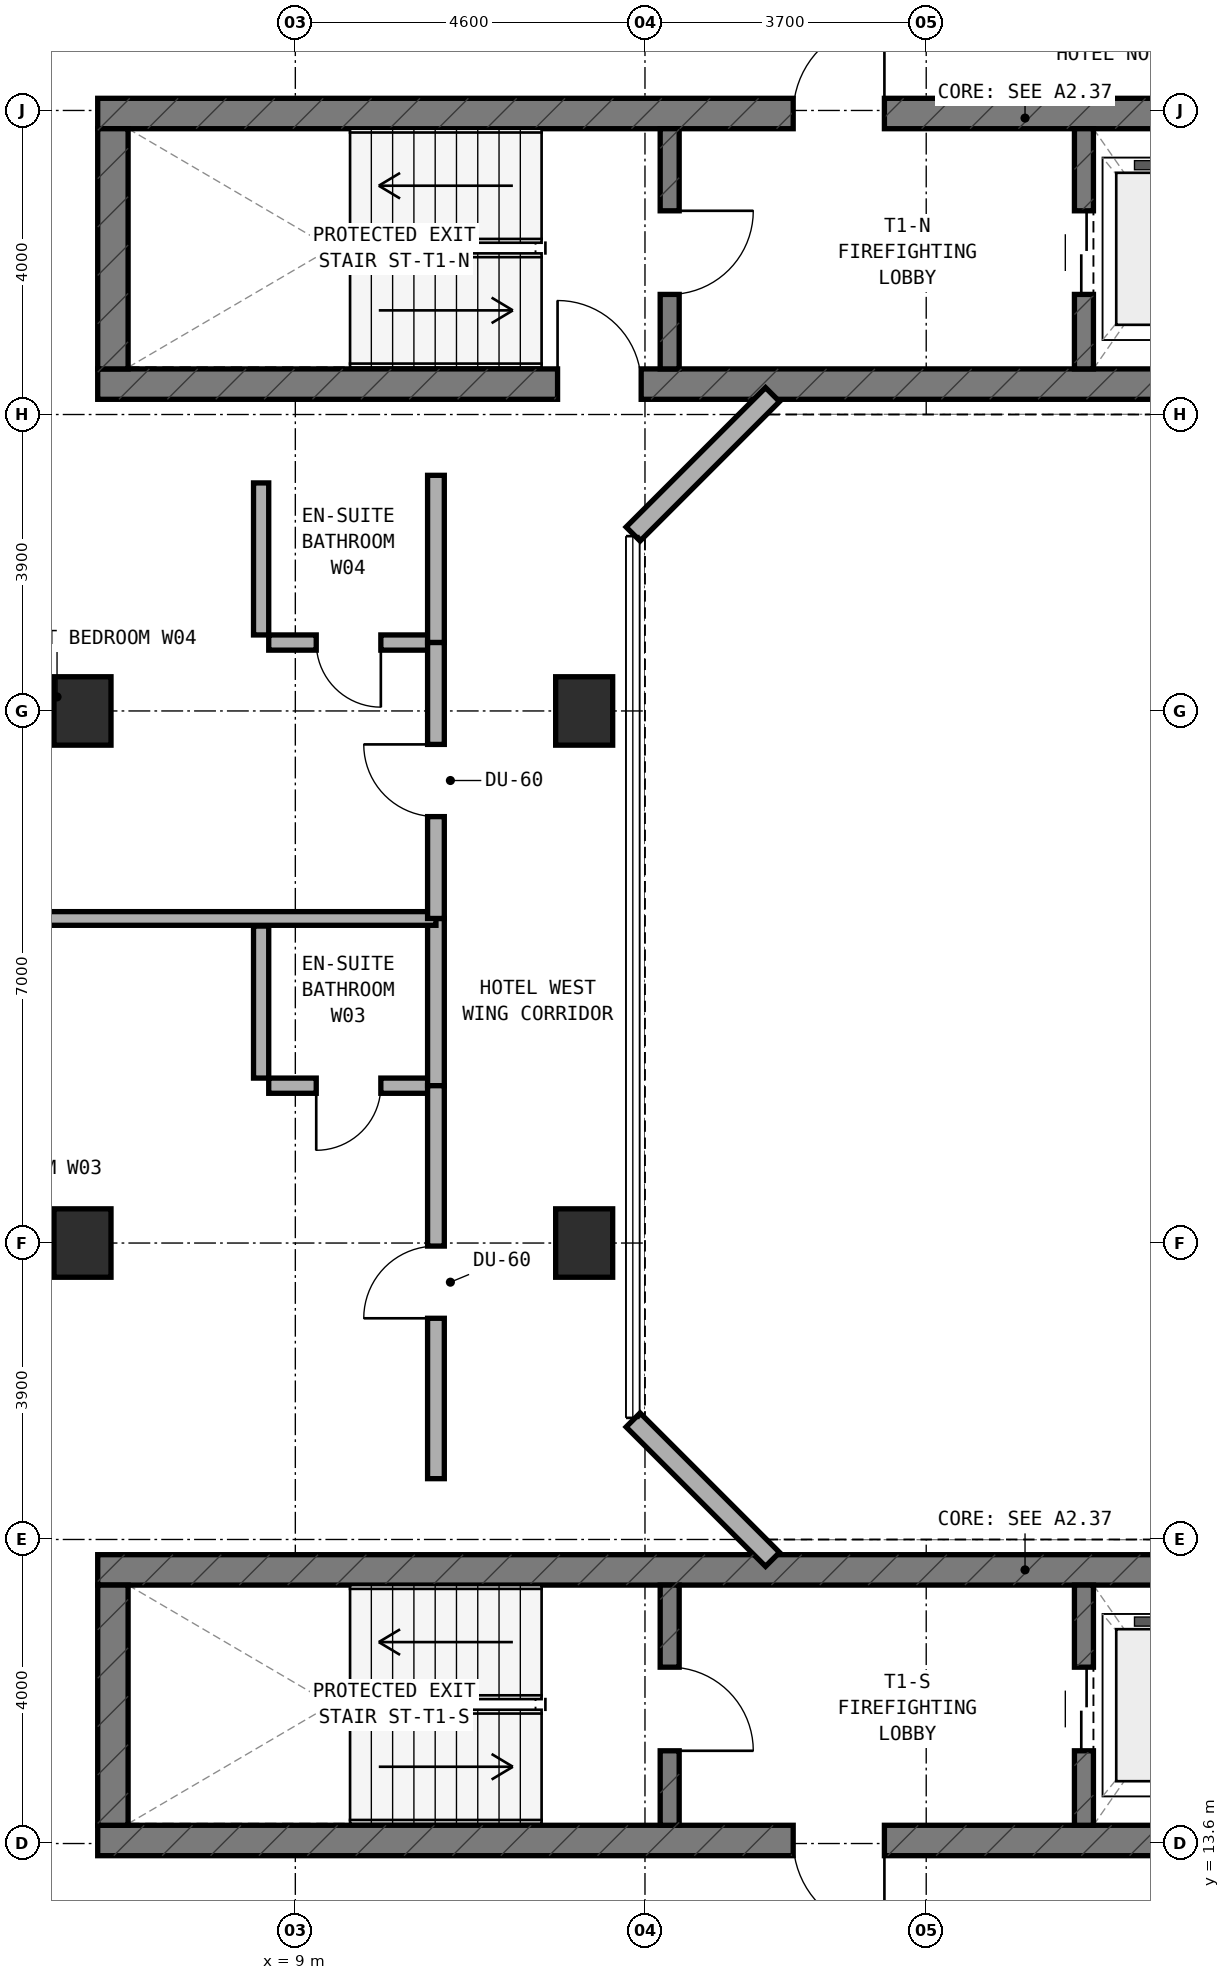
"""IFC4 building model, lengths in metres.
Left out: names, types, materials, properties, quantities, classifications, styles, units other than length and angle.
Written with IfcOpenShell. Run it as: python <this file> out.ifc"""

import sys

from ifc_helpers import new_model, si_unit, direction, frame, frame_2d, origin, origin_2d, place, context, subcontext, project, spatial, rectangle, extrude, element, fill, save


model = new_model("IFC4")
c1 = context("Model", 3, precision=1e-05, world=origin(), true_north=direction((0.0, 1.0)))
c2 = subcontext(c1, "Body", "Model", "MODEL_VIEW")
j1 = project(units=[si_unit("LENGTHUNIT", "METRE"), si_unit("PLANEANGLEUNIT", "RADIAN")], contexts=[c1])
p1 = place(None, origin())
s1 = spatial("IfcSite", under=j1, at=p1, CompositionType="ELEMENT")
p2 = place(p1, origin())
s2 = spatial("IfcBuilding", under=s1, at=p2, CompositionType="ELEMENT")
p3 = place(p2, frame((0.0, 0.0, 166.0)))
s3 = spatial("IfcBuildingStorey", under=s2, at=p3, CompositionType="ELEMENT", Elevation=166.0)
p4 = place(p3, frame((6.4, 32.8, 0.0), z_axis=(0.0, 0.0, 1.0), x_axis=(1.0, 0.0, 0.0)))
e1 = element("IfcWall", 1, at=p4, inside=s3, PredefinedType="SHEAR", context=c2, shape_type="SweptSolid", body=[
    extrude(rectangle(XDim=24.4, YDim=0.4, at=frame_2d((12.2, 0.0))), origin(), (0.0, 0.0, 1.0), 3.5),
])
p5 = place(p4, frame((6.05, 0.0, 0.0)))
e2 = element("IfcOpeningElement", 2, at=p5, cuts=e1, PredefinedType="OPENING", context=c2, shape_type="SweptSolid", body=[
    extrude(rectangle(XDim=1.1, YDim=2.15, at=frame_2d((0.55, 1.075))), frame((0.0, 0.21, 0.0), z_axis=(0.0, -1.0, 0.0), x_axis=(1.0, 0.0, 0.0)), (0.0, 0.0, 1.0), 0.42),
])
p6 = place(p3, frame((6.4, 36.36, 0.0), z_axis=(0.0, 0.0, 1.0), x_axis=(1.0, 0.0, 0.0)))
e3 = element("IfcWall", 3, at=p6, inside=s3, PredefinedType="SHEAR", context=c2, shape_type="SweptSolid", body=[
    extrude(rectangle(XDim=24.4, YDim=0.4, at=frame_2d((12.2, 0.0))), origin(), (0.0, 0.0, 1.0), 3.5),
])
p7 = place(p6, frame((9.15, 0.0, 0.0)))
e4 = element("IfcOpeningElement", 4, at=p7, cuts=e3, PredefinedType="OPENING", context=c2, shape_type="SweptSolid", body=[
    extrude(rectangle(XDim=1.2, YDim=2.15, at=frame_2d((0.6, 1.075))), frame((0.0, 0.21, 0.0), z_axis=(0.0, -1.0, 0.0), x_axis=(1.0, 0.0, 0.0)), (0.0, 0.0, 1.0), 0.42),
])
p8 = place(p6, frame((19.2, 0.0, 0.0)))
e5 = element("IfcOpeningElement", 5, at=p8, cuts=e3, PredefinedType="OPENING", context=c2, shape_type="SweptSolid", body=[
    extrude(rectangle(XDim=0.85, YDim=2.1, at=frame_2d((0.425, 1.05))), frame((0.0, 0.21, 0.0), z_axis=(0.0, -1.0, 0.0), x_axis=(1.0, 0.0, 0.0)), (0.0, 0.0, 1.0), 0.42),
])
p9 = place(p6, frame((17.22, 0.0, 0.0)))
e6 = element("IfcOpeningElement", 6, at=p9, cuts=e3, PredefinedType="OPENING", context=c2, shape_type="SweptSolid", body=[
    extrude(rectangle(XDim=0.85, YDim=2.1, at=frame_2d((0.425, 1.05))), frame((0.0, 0.21, 0.0), z_axis=(0.0, -1.0, 0.0), x_axis=(1.0, 0.0, 0.0)), (0.0, 0.0, 1.0), 0.42),
])
p10 = place(p3, frame((6.6, 33.0, 0.0), z_axis=(0.0, 0.0, 1.0), x_axis=(0.0, 1.0, 0.0)))
e7 = element("IfcWall", 7, at=p10, inside=s3, PredefinedType="SHEAR", context=c2, shape_type="SweptSolid", body=[
    extrude(rectangle(XDim=3.16, YDim=0.4, at=frame_2d((1.58, 0.0))), origin(), (0.0, 0.0, 1.0), 3.5),
])
p11 = place(p3, frame((13.925, 33.0, 0.0), z_axis=(0.0, 0.0, 1.0), x_axis=(0.0, 1.0, 0.0)))
e8 = element("IfcWall", 8, at=p11, inside=s3, PredefinedType="STANDARD", context=c2, shape_type="SweptSolid", body=[
    extrude(rectangle(XDim=3.16, YDim=0.25, at=frame_2d((1.58, 0.0))), origin(), (0.0, 0.0, 1.0), 3.22),
])
p12 = place(p11, frame((0.98, 0.0, 0.0)))
e9 = element("IfcOpeningElement", 9, at=p12, cuts=e8, PredefinedType="OPENING", context=c2, shape_type="SweptSolid", body=[
    extrude(rectangle(XDim=1.1, YDim=2.15, at=frame_2d((0.55, 1.075))), frame((0.0, 0.135, 0.0), z_axis=(0.0, -1.0, 0.0), x_axis=(1.0, 0.0, 0.0)), (0.0, 0.0, 1.0), 0.27),
])
p13 = place(p3, frame((19.375, 33.0, 0.0), z_axis=(0.0, 0.0, 1.0), x_axis=(0.0, 1.0, 0.0)))
e10 = element("IfcWall", 10, at=p13, inside=s3, PredefinedType="STANDARD", context=c2, shape_type="SweptSolid", body=[
    extrude(rectangle(XDim=3.16, YDim=0.25, at=frame_2d((1.58, 0.0))), origin(), (0.0, 0.0, 1.0), 3.22),
])
p14 = place(p13, frame((0.98, 0.0, 0.0)))
e11 = element("IfcOpeningElement", 11, at=p14, cuts=e10, PredefinedType="OPENING", context=c2, shape_type="SweptSolid", body=[
    extrude(rectangle(XDim=1.1, YDim=2.15, at=frame_2d((0.55, 1.075))), frame((0.0, 0.135, 0.0), z_axis=(0.0, -1.0, 0.0), x_axis=(1.0, 0.0, 0.0)), (0.0, 0.0, 1.0), 0.27),
])
p15 = place(p3, frame((6.4, 13.64, 0.0), z_axis=(0.0, 0.0, 1.0), x_axis=(1.0, 0.0, 0.0)))
e12 = element("IfcWall", 12, at=p15, inside=s3, PredefinedType="SHEAR", context=c2, shape_type="SweptSolid", body=[
    extrude(rectangle(XDim=24.4, YDim=0.4, at=frame_2d((12.2, 0.0))), origin(), (0.0, 0.0, 1.0), 3.5),
])
p16 = place(p15, frame((9.15, 0.0, 0.0)))
e13 = element("IfcOpeningElement", 13, at=p16, cuts=e12, PredefinedType="OPENING", context=c2, shape_type="SweptSolid", body=[
    extrude(rectangle(XDim=1.2, YDim=2.15, at=frame_2d((0.6, 1.075))), frame((0.0, 0.21, 0.0), z_axis=(0.0, -1.0, 0.0), x_axis=(1.0, 0.0, 0.0)), (0.0, 0.0, 1.0), 0.42),
])
p17 = place(p15, frame((17.22, 0.0, 0.0)))
e14 = element("IfcOpeningElement", 14, at=p17, cuts=e12, PredefinedType="OPENING", context=c2, shape_type="SweptSolid", body=[
    extrude(rectangle(XDim=0.85, YDim=2.1, at=frame_2d((0.425, 1.05))), frame((0.0, 0.21, 0.0), z_axis=(0.0, -1.0, 0.0), x_axis=(1.0, 0.0, 0.0)), (0.0, 0.0, 1.0), 0.42),
])
p18 = place(p15, frame((18.783, 0.0, 0.0)))
e15 = element("IfcOpeningElement", 15, at=p18, cuts=e12, PredefinedType="OPENING", context=c2, shape_type="SweptSolid", body=[
    extrude(rectangle(XDim=1.1, YDim=2.15, at=frame_2d((0.55, 1.075))), frame((0.0, 0.21, 0.0), z_axis=(0.0, -1.0, 0.0), x_axis=(1.0, 0.0, 0.0)), (0.0, 0.0, 1.0), 0.42),
])
p19 = place(p15, frame((20.65, 0.0, 0.0)))
e16 = element("IfcOpeningElement", 16, at=p19, cuts=e12, PredefinedType="OPENING", context=c2, shape_type="SweptSolid", body=[
    extrude(rectangle(XDim=1.1, YDim=2.15, at=frame_2d((0.55, 1.075))), frame((0.0, 0.21, 0.0), z_axis=(0.0, -1.0, 0.0), x_axis=(1.0, 0.0, 0.0)), (0.0, 0.0, 1.0), 0.42),
])
p20 = place(p15, frame((22.517, 0.0, 0.0)))
e17 = element("IfcOpeningElement", 17, at=p20, cuts=e12, PredefinedType="OPENING", context=c2, shape_type="SweptSolid", body=[
    extrude(rectangle(XDim=1.1, YDim=2.15, at=frame_2d((0.55, 1.075))), frame((0.0, 0.21, 0.0), z_axis=(0.0, -1.0, 0.0), x_axis=(1.0, 0.0, 0.0)), (0.0, 0.0, 1.0), 0.42),
])
p21 = place(p3, frame((6.4, 17.2, 0.0), z_axis=(0.0, 0.0, 1.0), x_axis=(1.0, 0.0, 0.0)))
e18 = element("IfcWall", 18, at=p21, inside=s3, PredefinedType="SHEAR", context=c2, shape_type="SweptSolid", body=[
    extrude(rectangle(XDim=24.4, YDim=0.4, at=frame_2d((12.2, 0.0))), origin(), (0.0, 0.0, 1.0), 3.5),
])
p22 = place(p3, frame((6.6, 13.84, 0.0), z_axis=(0.0, 0.0, 1.0), x_axis=(0.0, 1.0, 0.0)))
e19 = element("IfcWall", 19, at=p22, inside=s3, PredefinedType="SHEAR", context=c2, shape_type="SweptSolid", body=[
    extrude(rectangle(XDim=3.16, YDim=0.4, at=frame_2d((1.58, 0.0))), origin(), (0.0, 0.0, 1.0), 3.5),
])
p23 = place(p3, frame((13.925, 13.84, 0.0), z_axis=(0.0, 0.0, 1.0), x_axis=(0.0, 1.0, 0.0)))
e20 = element("IfcWall", 20, at=p23, inside=s3, PredefinedType="STANDARD", context=c2, shape_type="SweptSolid", body=[
    extrude(rectangle(XDim=3.16, YDim=0.25, at=frame_2d((1.58, 0.0))), origin(), (0.0, 0.0, 1.0), 3.22),
])
p24 = place(p23, frame((0.98, 0.0, 0.0)))
e21 = element("IfcOpeningElement", 21, at=p24, cuts=e20, PredefinedType="OPENING", context=c2, shape_type="SweptSolid", body=[
    extrude(rectangle(XDim=1.1, YDim=2.15, at=frame_2d((0.55, 1.075))), frame((0.0, 0.135, 0.0), z_axis=(0.0, -1.0, 0.0), x_axis=(1.0, 0.0, 0.0)), (0.0, 0.0, 1.0), 0.27),
])
p25 = place(p3, frame((19.375, 13.84, 0.0), z_axis=(0.0, 0.0, 1.0), x_axis=(0.0, 1.0, 0.0)))
e22 = element("IfcWall", 22, at=p25, inside=s3, PredefinedType="STANDARD", context=c2, shape_type="SweptSolid", body=[
    extrude(rectangle(XDim=3.16, YDim=0.25, at=frame_2d((1.58, 0.0))), origin(), (0.0, 0.0, 1.0), 3.22),
])
p26 = place(p25, frame((0.98, 0.0, 0.0)))
e23 = element("IfcOpeningElement", 23, at=p26, cuts=e22, PredefinedType="OPENING", context=c2, shape_type="SweptSolid", body=[
    extrude(rectangle(XDim=1.1, YDim=2.15, at=frame_2d((0.55, 1.075))), frame((0.0, 0.135, 0.0), z_axis=(0.0, -1.0, 0.0), x_axis=(1.0, 0.0, 0.0)), (0.0, 0.0, 1.0), 0.27),
])
for number, where, z_axis, x_axis in (
    (24, (6.2, 21.5, 0.0), (0.0, 0.0, 1.0), (1.0, 0.0, 0.0)),
    (25, (6.2, 28.5, 0.0), (0.0, 0.0, 1.0), (1.0, 0.0, 0.0)),
    (26, (12.8, 21.5, 0.0), (0.0, 0.0, 1.0), (1.0, 0.0, 0.0)),
    (27, (12.8, 28.5, 0.0), (0.0, 0.0, 1.0), (1.0, 0.0, 0.0)),
):
    element("IfcColumn", number, at=place(p3, frame(where, z_axis=z_axis, x_axis=x_axis)), inside=s3, PredefinedType="COLUMN", context=c2, shape_type="SweptSolid", body=[
        extrude(rectangle(XDim=0.75, YDim=0.9, at=origin_2d()), origin(), (0.0, 0.0, 1.0), 3.5),
    ])
for number, where, z_axis, x_axis in (
    (28, (15.278, 32.662, 0.0), (0.0, 0.0, 1.0), (-0.707, -0.707, 0.0)),
    (29, (13.444, 19.172, 0.0), (0.0, 0.0, 1.0), (0.707, -0.707, 0.0)),
):
    element("IfcWall", number, at=place(p3, frame(where, z_axis=z_axis, x_axis=x_axis)), inside=s3, PredefinedType="STANDARD", context=c2, shape_type="SweptSolid", body=[
        extrude(rectangle(XDim=2.594, YDim=0.26, at=frame_2d((1.297, 0.0))), origin(), (0.0, 0.0, 1.0), 3.22),
    ])
p27 = place(p3, frame((8.65, 23.57, 0.0), z_axis=(0.0, 0.0, 1.0), x_axis=(1.0, 0.0, 0.0)))
e30 = element("IfcWall", 30, at=p27, inside=s3, PredefinedType="PLUMBINGWALL", context=c2, shape_type="SweptSolid", body=[
    extrude(rectangle(XDim=2.1, YDim=0.2, at=frame_2d((1.05, 0.0))), origin(), (0.0, 0.0, 1.0), 3.22),
])
p28 = place(p27, frame((0.625, 0.0, 0.0)))
e31 = element("IfcOpeningElement", 31, at=p28, cuts=e30, PredefinedType="OPENING", context=c2, shape_type="SweptSolid", body=[
    extrude(rectangle(XDim=0.85, YDim=2.1, at=frame_2d((0.425, 1.05))), frame((0.0, 0.11, 0.0), z_axis=(0.0, -1.0, 0.0), x_axis=(1.0, 0.0, 0.0)), (0.0, 0.0, 1.0), 0.22),
])
p29 = place(p3, frame((8.55, 23.67, 0.0), z_axis=(0.0, 0.0, 1.0), x_axis=(0.0, 1.0, 0.0)))
e32 = element("IfcWall", 32, at=p29, inside=s3, PredefinedType="PLUMBINGWALL", context=c2, shape_type="SweptSolid", body=[
    extrude(rectangle(XDim=2.0, YDim=0.2, at=frame_2d((1.0, 0.0))), origin(), (0.0, 0.0, 1.0), 3.22),
])
p30 = place(p3, frame((10.85, 23.57, 0.0), z_axis=(0.0, 0.0, 1.0), x_axis=(0.0, 1.0, 0.0)))
e33 = element("IfcWall", 33, at=p30, inside=s3, PredefinedType="SOLIDWALL", context=c2, shape_type="SweptSolid", body=[
    extrude(rectangle(XDim=2.2, YDim=0.22, at=frame_2d((1.1, 0.0))), origin(), (0.0, 0.0, 1.0), 3.22),
])
p31 = place(p3, frame((10.85, 18.4, 0.0), z_axis=(0.0, 0.0, 1.0), x_axis=(0.0, 1.0, 0.0)))
e34 = element("IfcWall", 34, at=p31, inside=s3, PredefinedType="SOLIDWALL", context=c2, shape_type="SweptSolid", body=[
    extrude(rectangle(XDim=5.17, YDim=0.22, at=frame_2d((2.585, 0.0))), origin(), (0.0, 0.0, 1.0), 2.795),
])
p32 = place(p31, frame((2.11, 0.0, 0.0)))
e35 = element("IfcOpeningElement", 35, at=p32, cuts=e34, PredefinedType="OPENING", context=c2, shape_type="SweptSolid", body=[
    extrude(rectangle(XDim=0.95, YDim=2.1, at=frame_2d((0.475, 1.05))), frame((0.0, 0.12, 0.0), z_axis=(0.0, -1.0, 0.0), x_axis=(1.0, 0.0, 0.0)), (0.0, 0.0, 1.0), 0.24),
])
p33 = place(p3, frame((0.86, 25.77, 0.0), z_axis=(0.0, 0.0, 1.0), x_axis=(1.0, 0.0, 0.0)))
e36 = element("IfcWall", 36, at=p33, inside=s3, PredefinedType="SOLIDWALL", context=c2, shape_type="SweptSolid", body=[
    extrude(rectangle(XDim=9.99, YDim=0.18, at=frame_2d((4.995, 0.0))), origin(), (0.0, 0.0, 1.0), 2.835),
])
p34 = place(p3, frame((8.65, 29.4, 0.0), z_axis=(0.0, 0.0, 1.0), x_axis=(1.0, 0.0, 0.0)))
e37 = element("IfcWall", 37, at=p34, inside=s3, PredefinedType="PLUMBINGWALL", context=c2, shape_type="SweptSolid", body=[
    extrude(rectangle(XDim=2.1, YDim=0.2, at=frame_2d((1.05, 0.0))), origin(), (0.0, 0.0, 1.0), 3.22),
])
p35 = place(p34, frame((0.625, 0.0, 0.0)))
e38 = element("IfcOpeningElement", 38, at=p35, cuts=e37, PredefinedType="OPENING", context=c2, shape_type="SweptSolid", body=[
    extrude(rectangle(XDim=0.85, YDim=2.1, at=frame_2d((0.425, 1.05))), frame((0.0, 0.11, 0.0), z_axis=(0.0, -1.0, 0.0), x_axis=(1.0, 0.0, 0.0)), (0.0, 0.0, 1.0), 0.22),
])
p36 = place(p3, frame((8.55, 29.5, 0.0), z_axis=(0.0, 0.0, 1.0), x_axis=(0.0, 1.0, 0.0)))
e39 = element("IfcWall", 39, at=p36, inside=s3, PredefinedType="PLUMBINGWALL", context=c2, shape_type="SweptSolid", body=[
    extrude(rectangle(XDim=2.0, YDim=0.2, at=frame_2d((1.0, 0.0))), origin(), (0.0, 0.0, 1.0), 3.22),
])
p37 = place(p3, frame((10.85, 29.4, 0.0), z_axis=(0.0, 0.0, 1.0), x_axis=(0.0, 1.0, 0.0)))
e40 = element("IfcWall", 40, at=p37, inside=s3, PredefinedType="SOLIDWALL", context=c2, shape_type="SweptSolid", body=[
    extrude(rectangle(XDim=2.2, YDim=0.22, at=frame_2d((1.1, 0.0))), origin(), (0.0, 0.0, 1.0), 3.22),
])
p38 = place(p3, frame((10.85, 25.77, 0.0), z_axis=(0.0, 0.0, 1.0), x_axis=(0.0, 1.0, 0.0)))
e41 = element("IfcWall", 41, at=p38, inside=s3, PredefinedType="SOLIDWALL", context=c2, shape_type="SweptSolid", body=[
    extrude(rectangle(XDim=3.63, YDim=0.22, at=frame_2d((1.815, 0.0))), origin(), (0.0, 0.0, 1.0), 2.795),
])
p39 = place(p38, frame((1.34, 0.0, 0.0)))
e42 = element("IfcOpeningElement", 42, at=p39, cuts=e41, PredefinedType="OPENING", context=c2, shape_type="SweptSolid", body=[
    extrude(rectangle(XDim=0.95, YDim=2.1, at=frame_2d((0.475, 1.05))), frame((0.0, 0.12, 0.0), z_axis=(0.0, -1.0, 0.0), x_axis=(1.0, 0.0, 0.0)), (0.0, 0.0, 1.0), 0.24),
])
p40 = place(p12, frame((1.1, 0.0, 0.0), z_axis=(0.0, 0.0, 1.0), x_axis=(-1.0, 0.0, 0.0)))
e43 = element("IfcDoor", 43, at=p40, inside=s3, OperationType="SINGLE_SWING_LEFT", PredefinedType="DOOR", context=c2, shape_type="SweptSolid", body=[
    extrude(rectangle(XDim=1.1, YDim=2.15, at=frame_2d((0.55, 1.075))), frame((0.0, 0.025, 0.0), z_axis=(0.0, -1.0, 0.0), x_axis=(1.0, 0.0, 0.0)), (0.0, 0.0, 1.0), 0.05),
])
fill(e9, e43)
p41 = place(p7, origin())
e44 = element("IfcDoor", 44, at=p41, inside=s3, OperationType="SINGLE_SWING_RIGHT", PredefinedType="DOOR", context=c2, shape_type="SweptSolid", body=[
    extrude(rectangle(XDim=1.2, YDim=2.15, at=frame_2d((0.6, 1.075))), frame((0.0, 0.025, 0.0), z_axis=(0.0, -1.0, 0.0), x_axis=(1.0, 0.0, 0.0)), (0.0, 0.0, 1.0), 0.05),
])
fill(e4, e44)
p42 = place(p14, origin())
e45 = element("IfcDoor", 45, at=p42, inside=s3, OperationType="DOUBLE_DOOR_SLIDING", PredefinedType="DOOR", context=c2, shape_type="SweptSolid", body=[
    extrude(rectangle(XDim=1.1, YDim=2.15, at=frame_2d((0.55, 1.075))), frame((0.0, 0.025, 0.0), z_axis=(0.0, -1.0, 0.0), x_axis=(1.0, 0.0, 0.0)), (0.0, 0.0, 1.0), 0.05),
])
fill(e11, e45)
p43 = place(p24, frame((1.1, 0.0, 0.0), z_axis=(0.0, 0.0, 1.0), x_axis=(-1.0, 0.0, 0.0)))
e46 = element("IfcDoor", 46, at=p43, inside=s3, OperationType="SINGLE_SWING_RIGHT", PredefinedType="DOOR", context=c2, shape_type="SweptSolid", body=[
    extrude(rectangle(XDim=1.1, YDim=2.15, at=frame_2d((0.55, 1.075))), frame((0.0, 0.025, 0.0), z_axis=(0.0, -1.0, 0.0), x_axis=(1.0, 0.0, 0.0)), (0.0, 0.0, 1.0), 0.05),
])
fill(e21, e46)
p44 = place(p16, frame((1.2, 0.0, 0.0), z_axis=(0.0, 0.0, 1.0), x_axis=(-1.0, 0.0, 0.0)))
e47 = element("IfcDoor", 47, at=p44, inside=s3, OperationType="SINGLE_SWING_LEFT", PredefinedType="DOOR", context=c2, shape_type="SweptSolid", body=[
    extrude(rectangle(XDim=1.2, YDim=2.15, at=frame_2d((0.6, 1.075))), frame((0.0, 0.025, 0.0), z_axis=(0.0, -1.0, 0.0), x_axis=(1.0, 0.0, 0.0)), (0.0, 0.0, 1.0), 0.05),
])
fill(e13, e47)
p45 = place(p26, origin())
e48 = element("IfcDoor", 48, at=p45, inside=s3, OperationType="DOUBLE_DOOR_SLIDING", PredefinedType="DOOR", context=c2, shape_type="SweptSolid", body=[
    extrude(rectangle(XDim=1.1, YDim=2.15, at=frame_2d((0.55, 1.075))), frame((0.0, 0.025, 0.0), z_axis=(0.0, -1.0, 0.0), x_axis=(1.0, 0.0, 0.0)), (0.0, 0.0, 1.0), 0.05),
])
fill(e23, e48)
p46 = place(p5, origin())
e49 = element("IfcDoor", 49, at=p46, inside=s3, OperationType="SINGLE_SWING_LEFT", PredefinedType="DOOR", context=c2, shape_type="SweptSolid", body=[
    extrude(rectangle(XDim=1.1, YDim=2.15, at=frame_2d((0.55, 1.075))), frame((0.0, 0.025, 0.0), z_axis=(0.0, -1.0, 0.0), x_axis=(1.0, 0.0, 0.0)), (0.0, 0.0, 1.0), 0.05),
])
fill(e2, e49)
p47 = place(p28, frame((0.85, 0.0, 0.0), z_axis=(0.0, 0.0, 1.0), x_axis=(-1.0, 0.0, 0.0)))
e50 = element("IfcDoor", 50, at=p47, inside=s3, OperationType="SINGLE_SWING_RIGHT", PredefinedType="DOOR", context=c2, shape_type="SweptSolid", body=[
    extrude(rectangle(XDim=0.85, YDim=2.1, at=frame_2d((0.425, 1.05))), frame((0.0, 0.025, 0.0), z_axis=(0.0, -1.0, 0.0), x_axis=(1.0, 0.0, 0.0)), (0.0, 0.0, 1.0), 0.05),
])
fill(e31, e50)
p48 = place(p32, origin())
e51 = element("IfcDoor", 51, at=p48, inside=s3, OperationType="SINGLE_SWING_LEFT", PredefinedType="DOOR", context=c2, shape_type="SweptSolid", body=[
    extrude(rectangle(XDim=0.95, YDim=2.1, at=frame_2d((0.475, 1.05))), frame((0.0, 0.025, 0.0), z_axis=(0.0, -1.0, 0.0), x_axis=(1.0, 0.0, 0.0)), (0.0, 0.0, 1.0), 0.05),
])
fill(e35, e51)
p49 = place(p35, frame((0.85, 0.0, 0.0), z_axis=(0.0, 0.0, 1.0), x_axis=(-1.0, 0.0, 0.0)))
e52 = element("IfcDoor", 52, at=p49, inside=s3, OperationType="SINGLE_SWING_LEFT", PredefinedType="DOOR", context=c2, shape_type="SweptSolid", body=[
    extrude(rectangle(XDim=0.85, YDim=2.1, at=frame_2d((0.425, 1.05))), frame((0.0, 0.025, 0.0), z_axis=(0.0, -1.0, 0.0), x_axis=(1.0, 0.0, 0.0)), (0.0, 0.0, 1.0), 0.05),
])
fill(e38, e52)
p50 = place(p39, origin())
e53 = element("IfcDoor", 53, at=p50, inside=s3, OperationType="SINGLE_SWING_RIGHT", PredefinedType="DOOR", context=c2, shape_type="SweptSolid", body=[
    extrude(rectangle(XDim=0.95, YDim=2.1, at=frame_2d((0.475, 1.05))), frame((0.0, 0.025, 0.0), z_axis=(0.0, -1.0, 0.0), x_axis=(1.0, 0.0, 0.0)), (0.0, 0.0, 1.0), 0.05),
])
fill(e42, e53)
save(model, sys.argv[1])
